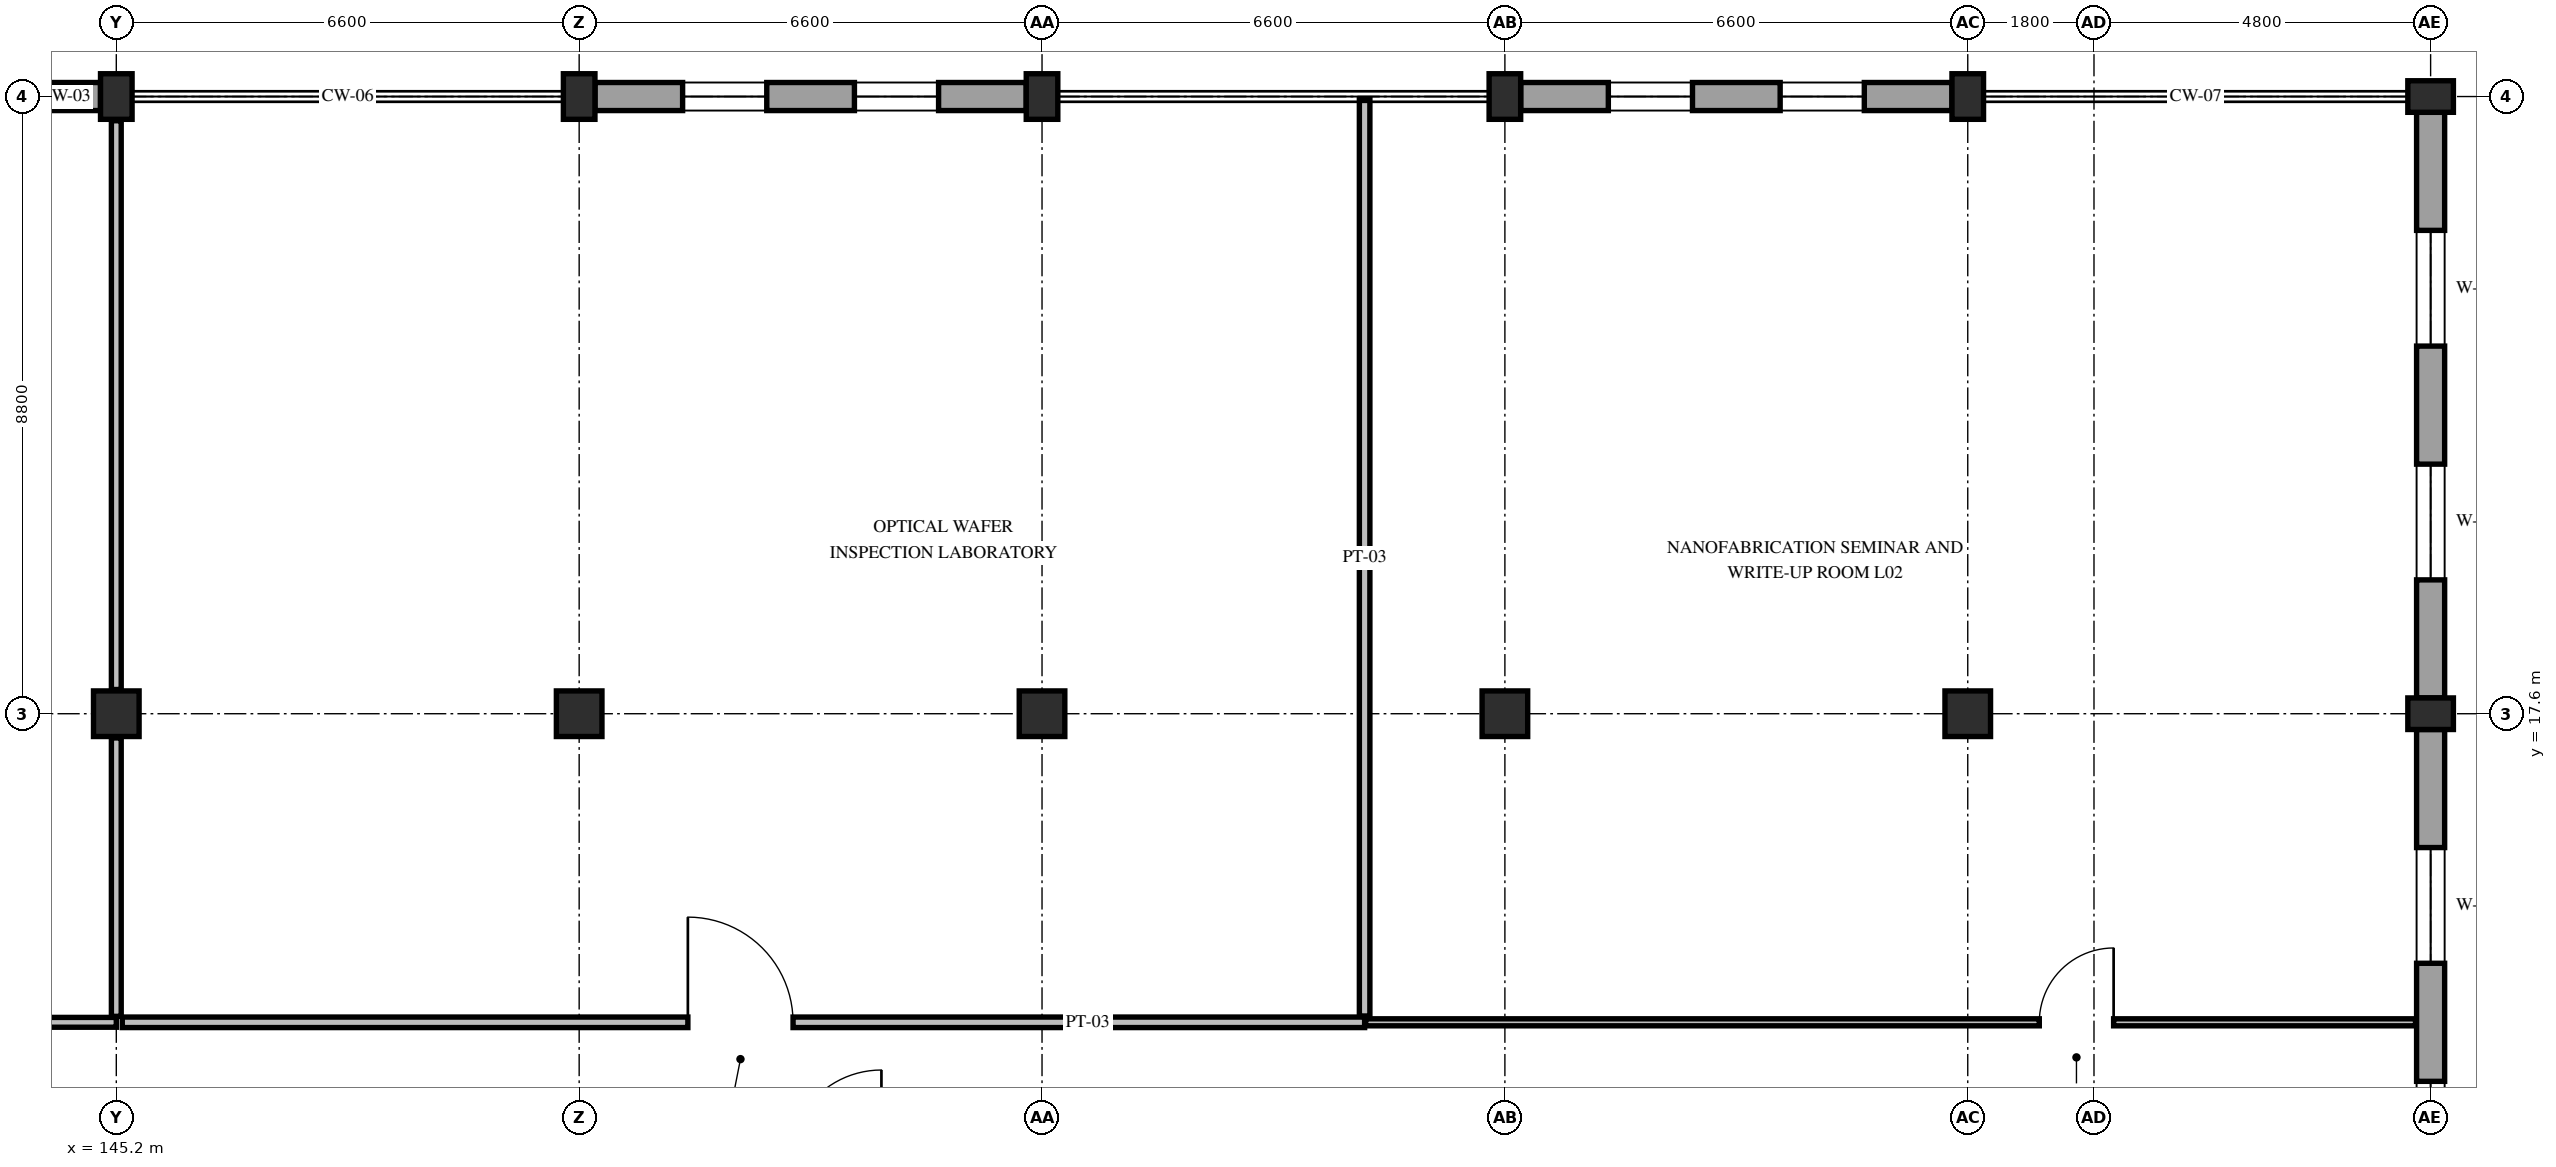
"""IFC4 building model, lengths in metres.
Left out: names, types, materials, properties, quantities, classifications, styles, units other than length and angle.
Written with IfcOpenShell. Run it as: python <this file> out.ifc"""

import sys

from ifc_helpers import new_model, si_unit, direction, frame, frame_2d, origin, origin_2d, place, context, subcontext, project, spatial, rectangle, extrude, element, fill, save


model = new_model("IFC4")
c1 = context("Model", 3, precision=1e-05, world=origin(), true_north=direction((0.0, 1.0)))
c2 = subcontext(c1, "Body", "Model", "MODEL_VIEW")
j1 = project(units=[si_unit("LENGTHUNIT", "METRE"), si_unit("PLANEANGLEUNIT", "RADIAN")], contexts=[c1])
p1 = place(None, origin())
s1 = spatial("IfcSite", under=j1, at=p1, CompositionType="ELEMENT")
p2 = place(p1, origin())
s2 = spatial("IfcBuilding", under=s1, at=p2, CompositionType="ELEMENT")
p3 = place(p2, frame((0.0, 0.0, 10.2)))
s3 = spatial("IfcBuildingStorey", under=s2, at=p3, CompositionType="ELEMENT", Elevation=10.2)
p4 = place(p3, frame((145.2, 17.6, 0.0), z_axis=(0.0, 0.0, 1.0), x_axis=(1.0, 0.0, 0.0)))
e1 = element("IfcColumn", 1, at=p4, inside=s3, PredefinedType="COLUMN", context=c2, shape_type="SweptSolid", body=[
    extrude(rectangle(XDim=0.65, YDim=0.65, at=origin_2d()), origin(), (0.0, 0.0, 1.0), 4.8),
])
p5 = place(p3, frame((145.2, 26.4, 0.0), z_axis=(0.0, 0.0, 1.0), x_axis=(1.0, 0.0, 0.0)))
e2 = element("IfcColumn", 2, at=p5, inside=s3, PredefinedType="PILASTER", context=c2, shape_type="SweptSolid", body=[
    extrude(rectangle(XDim=0.45, YDim=0.65, at=origin_2d()), origin(), (0.0, 0.0, 1.0), 4.8),
])
p6 = place(p3, frame((151.8, 17.6, 0.0), z_axis=(0.0, 0.0, 1.0), x_axis=(1.0, 0.0, 0.0)))
e3 = element("IfcColumn", 3, at=p6, inside=s3, PredefinedType="COLUMN", context=c2, shape_type="SweptSolid", body=[
    extrude(rectangle(XDim=0.65, YDim=0.65, at=origin_2d()), origin(), (0.0, 0.0, 1.0), 4.8),
])
p7 = place(p3, frame((151.8, 26.4, 0.0), z_axis=(0.0, 0.0, 1.0), x_axis=(1.0, 0.0, 0.0)))
e4 = element("IfcColumn", 4, at=p7, inside=s3, PredefinedType="PILASTER", context=c2, shape_type="SweptSolid", body=[
    extrude(rectangle(XDim=0.45, YDim=0.65, at=origin_2d()), origin(), (0.0, 0.0, 1.0), 4.8),
])
p8 = place(p3, frame((158.4, 17.6, 0.0), z_axis=(0.0, 0.0, 1.0), x_axis=(1.0, 0.0, 0.0)))
e5 = element("IfcColumn", 5, at=p8, inside=s3, PredefinedType="COLUMN", context=c2, shape_type="SweptSolid", body=[
    extrude(rectangle(XDim=0.65, YDim=0.65, at=origin_2d()), origin(), (0.0, 0.0, 1.0), 4.8),
])
p9 = place(p3, frame((158.4, 26.4, 0.0), z_axis=(0.0, 0.0, 1.0), x_axis=(1.0, 0.0, 0.0)))
e6 = element("IfcColumn", 6, at=p9, inside=s3, PredefinedType="PILASTER", context=c2, shape_type="SweptSolid", body=[
    extrude(rectangle(XDim=0.45, YDim=0.65, at=origin_2d()), origin(), (0.0, 0.0, 1.0), 4.8),
])
p10 = place(p3, frame((165.0, 17.6, 0.0), z_axis=(0.0, 0.0, 1.0), x_axis=(1.0, 0.0, 0.0)))
e7 = element("IfcColumn", 7, at=p10, inside=s3, PredefinedType="COLUMN", context=c2, shape_type="SweptSolid", body=[
    extrude(rectangle(XDim=0.65, YDim=0.65, at=origin_2d()), origin(), (0.0, 0.0, 1.0), 4.8),
])
p11 = place(p3, frame((165.0, 26.4, 0.0), z_axis=(0.0, 0.0, 1.0), x_axis=(1.0, 0.0, 0.0)))
e8 = element("IfcColumn", 8, at=p11, inside=s3, PredefinedType="PILASTER", context=c2, shape_type="SweptSolid", body=[
    extrude(rectangle(XDim=0.45, YDim=0.65, at=origin_2d()), origin(), (0.0, 0.0, 1.0), 4.8),
])
p12 = place(p3, frame((171.6, 17.6, 0.0), z_axis=(0.0, 0.0, 1.0), x_axis=(1.0, 0.0, 0.0)))
e9 = element("IfcColumn", 9, at=p12, inside=s3, PredefinedType="COLUMN", context=c2, shape_type="SweptSolid", body=[
    extrude(rectangle(XDim=0.65, YDim=0.65, at=origin_2d()), origin(), (0.0, 0.0, 1.0), 4.8),
])
for number, where, z_axis, x_axis in (
    (10, (171.6, 26.4, 0.0), (0.0, 0.0, 1.0), (1.0, 0.0, 0.0)),
    (11, (178.2, 17.6, 0.0), (0.0, 0.0, 1.0), (0.0, 1.0, 0.0)),
    (12, (178.2, 26.4, 0.0), (0.0, 0.0, 1.0), (0.0, 1.0, 0.0)),
):
    element("IfcColumn", number, at=place(p3, frame(where, z_axis=z_axis, x_axis=x_axis)), inside=s3, PredefinedType="PILASTER", context=c2, shape_type="SweptSolid", body=[
        extrude(rectangle(XDim=0.45, YDim=0.65, at=origin_2d()), origin(), (0.0, 0.0, 1.0), 4.8),
    ])
p13 = place(p3, frame((138.825, 26.4, 0.0), z_axis=(0.0, 0.0, 1.0), x_axis=(1.0, 0.0, 0.0)))
e13 = element("IfcWall", 13, at=p13, inside=s3, PredefinedType="STANDARD", context=c2, shape_type="SweptSolid", body=[
    extrude(rectangle(XDim=6.15, YDim=0.4, at=frame_2d((3.075, 0.0))), origin(), (0.0, 0.0, 1.0), 3.98),
])
p14 = place(p13, frame((1.25, 0.0, 0.85)))
e14 = element("IfcOpeningElement", 14, at=p14, cuts=e13, PredefinedType="OPENING", context=c2, shape_type="SweptSolid", body=[
    extrude(rectangle(XDim=1.2, YDim=1.88, at=frame_2d((0.6, 0.94))), frame((0.0, 0.215, 0.0), z_axis=(0.0, -1.0, 0.0), x_axis=(1.0, 0.0, 0.0)), (0.0, 0.0, 1.0), 0.43),
])
p15 = place(p13, frame((3.7, 0.0, 0.85)))
e15 = element("IfcOpeningElement", 15, at=p15, cuts=e13, PredefinedType="OPENING", context=c2, shape_type="SweptSolid", body=[
    extrude(rectangle(XDim=1.2, YDim=1.88, at=frame_2d((0.6, 0.94))), frame((0.0, 0.215, 0.0), z_axis=(0.0, -1.0, 0.0), x_axis=(1.0, 0.0, 0.0)), (0.0, 0.0, 1.0), 0.43),
])
p16 = place(p3, frame((152.025, 26.4, 0.0), z_axis=(0.0, 0.0, 1.0), x_axis=(1.0, 0.0, 0.0)))
e16 = element("IfcWall", 16, at=p16, inside=s3, PredefinedType="STANDARD", context=c2, shape_type="SweptSolid", body=[
    extrude(rectangle(XDim=6.15, YDim=0.4, at=frame_2d((3.075, 0.0))), origin(), (0.0, 0.0, 1.0), 3.98),
])
p17 = place(p16, frame((1.25, 0.0, 0.85)))
e17 = element("IfcOpeningElement", 17, at=p17, cuts=e16, PredefinedType="OPENING", context=c2, shape_type="SweptSolid", body=[
    extrude(rectangle(XDim=1.2, YDim=1.88, at=frame_2d((0.6, 0.94))), frame((0.0, 0.215, 0.0), z_axis=(0.0, -1.0, 0.0), x_axis=(1.0, 0.0, 0.0)), (0.0, 0.0, 1.0), 0.43),
])
p18 = place(p16, frame((3.7, 0.0, 0.85)))
e18 = element("IfcOpeningElement", 18, at=p18, cuts=e16, PredefinedType="OPENING", context=c2, shape_type="SweptSolid", body=[
    extrude(rectangle(XDim=1.2, YDim=1.88, at=frame_2d((0.6, 0.94))), frame((0.0, 0.215, 0.0), z_axis=(0.0, -1.0, 0.0), x_axis=(1.0, 0.0, 0.0)), (0.0, 0.0, 1.0), 0.43),
])
p19 = place(p3, frame((165.225, 26.4, 0.0), z_axis=(0.0, 0.0, 1.0), x_axis=(1.0, 0.0, 0.0)))
e19 = element("IfcWall", 19, at=p19, inside=s3, PredefinedType="STANDARD", context=c2, shape_type="SweptSolid", body=[
    extrude(rectangle(XDim=6.15, YDim=0.4, at=frame_2d((3.075, 0.0))), origin(), (0.0, 0.0, 1.0), 3.98),
])
p20 = place(p19, frame((1.25, 0.0, 0.85)))
e20 = element("IfcOpeningElement", 20, at=p20, cuts=e19, PredefinedType="OPENING", context=c2, shape_type="SweptSolid", body=[
    extrude(rectangle(XDim=1.2, YDim=1.88, at=frame_2d((0.6, 0.94))), frame((0.0, 0.215, 0.0), z_axis=(0.0, -1.0, 0.0), x_axis=(1.0, 0.0, 0.0)), (0.0, 0.0, 1.0), 0.43),
])
p21 = place(p19, frame((3.7, 0.0, 0.85)))
e21 = element("IfcOpeningElement", 21, at=p21, cuts=e19, PredefinedType="OPENING", context=c2, shape_type="SweptSolid", body=[
    extrude(rectangle(XDim=1.2, YDim=1.88, at=frame_2d((0.6, 0.94))), frame((0.0, 0.215, 0.0), z_axis=(0.0, -1.0, 0.0), x_axis=(1.0, 0.0, 0.0)), (0.0, 0.0, 1.0), 0.43),
])
p22 = place(p3, frame((178.2, 26.175, 0.0), z_axis=(0.0, 0.0, 1.0), x_axis=(0.0, -1.0, 0.0)))
e22 = element("IfcWall", 22, at=p22, inside=s3, PredefinedType="STANDARD", context=c2, shape_type="SweptSolid", body=[
    extrude(rectangle(XDim=8.35, YDim=0.4, at=frame_2d((4.175, 0.0))), origin(), (0.0, 0.0, 1.0), 3.98),
])
p23 = place(p22, frame((1.683, 0.0, 0.85)))
e23 = element("IfcOpeningElement", 23, at=p23, cuts=e22, PredefinedType="OPENING", context=c2, shape_type="SweptSolid", body=[
    extrude(rectangle(XDim=1.65, YDim=2.04, at=frame_2d((0.825, 1.02))), frame((0.0, 0.215, 0.0), z_axis=(0.0, -1.0, 0.0), x_axis=(1.0, 0.0, 0.0)), (0.0, 0.0, 1.0), 0.43),
])
p24 = place(p22, frame((5.017, 0.0, 0.85)))
e24 = element("IfcOpeningElement", 24, at=p24, cuts=e22, PredefinedType="OPENING", context=c2, shape_type="SweptSolid", body=[
    extrude(rectangle(XDim=1.65, YDim=2.04, at=frame_2d((0.825, 1.02))), frame((0.0, 0.215, 0.0), z_axis=(0.0, -1.0, 0.0), x_axis=(1.0, 0.0, 0.0)), (0.0, 0.0, 1.0), 0.43),
])
p25 = place(p3, frame((178.2, 17.375, 0.0), z_axis=(0.0, 0.0, 1.0), x_axis=(0.0, -1.0, 0.0)))
e25 = element("IfcWall", 25, at=p25, inside=s3, PredefinedType="STANDARD", context=c2, shape_type="SweptSolid", body=[
    extrude(rectangle(XDim=8.35, YDim=0.4, at=frame_2d((4.175, 0.0))), origin(), (0.0, 0.0, 1.0), 3.98),
])
p26 = place(p25, frame((1.683, 0.0, 0.85)))
e26 = element("IfcOpeningElement", 26, at=p26, cuts=e25, PredefinedType="OPENING", context=c2, shape_type="SweptSolid", body=[
    extrude(rectangle(XDim=1.65, YDim=2.04, at=frame_2d((0.825, 1.02))), frame((0.0, 0.215, 0.0), z_axis=(0.0, -1.0, 0.0), x_axis=(1.0, 0.0, 0.0)), (0.0, 0.0, 1.0), 0.43),
])
p27 = place(p25, frame((5.017, 0.0, 0.85)))
e27 = element("IfcOpeningElement", 27, at=p27, cuts=e25, PredefinedType="OPENING", context=c2, shape_type="SweptSolid", body=[
    extrude(rectangle(XDim=1.65, YDim=2.04, at=frame_2d((0.825, 1.02))), frame((0.0, 0.215, 0.0), z_axis=(0.0, -1.0, 0.0), x_axis=(1.0, 0.0, 0.0)), (0.0, 0.0, 1.0), 0.43),
])
p28 = place(p3, frame((118.885, 13.2, 0.0), z_axis=(0.0, 0.0, 1.0), x_axis=(1.0, 0.0, 0.0)))
e28 = element("IfcWall", 28, at=p28, inside=s3, PredefinedType="PARTITIONING", context=c2, shape_type="SweptSolid", body=[
    extrude(rectangle(XDim=26.315, YDim=0.14, at=frame_2d((13.157, 0.0))), origin(), (0.0, 0.0, 1.0), 4.065),
])
p29 = place(p28, frame((13.755, 0.0, 0.0)))
e29 = element("IfcOpeningElement", 29, at=p29, cuts=e28, PredefinedType="OPENING", context=c2, shape_type="SweptSolid", body=[
    extrude(rectangle(XDim=1.82, YDim=2.35, at=frame_2d((0.91, 1.175))), frame((0.0, 0.085, 0.0), z_axis=(0.0, -1.0, 0.0), x_axis=(1.0, 0.0, 0.0)), (0.0, 0.0, 1.0), 0.17),
])
p30 = place(p3, frame((145.2, 13.285, 0.0), z_axis=(0.0, 0.0, 1.0), x_axis=(0.0, 1.0, 0.0)))
e30 = element("IfcWall", 30, at=p30, inside=s3, PredefinedType="PARTITIONING", context=c2, shape_type="SweptSolid", body=[
    extrude(rectangle(XDim=3.97, YDim=0.14, at=frame_2d((1.985, 0.0))), origin(), (0.0, 0.0, 1.0), 4.065),
])
p31 = place(p3, frame((145.2, 17.945, 0.0), z_axis=(0.0, 0.0, 1.0), x_axis=(0.0, 1.0, 0.0)))
e31 = element("IfcWall", 31, at=p31, inside=s3, PredefinedType="PARTITIONING", context=c2, shape_type="SweptSolid", body=[
    extrude(rectangle(XDim=8.11, YDim=0.14, at=frame_2d((4.055, 0.0))), origin(), (0.0, 0.0, 1.0), 4.065),
])
p32 = place(p3, frame((145.285, 13.2, 0.0), z_axis=(0.0, 0.0, 1.0), x_axis=(1.0, 0.0, 0.0)))
e32 = element("IfcWall", 32, at=p32, inside=s3, PredefinedType="PARTITIONING", context=c2, shape_type="SweptSolid", body=[
    extrude(rectangle(XDim=17.715, YDim=0.15, at=frame_2d((8.857, 0.0))), origin(), (0.0, 0.0, 1.0), 4.065),
])
p33 = place(p32, frame((8.065, 0.0, 0.0)))
e33 = element("IfcOpeningElement", 33, at=p33, cuts=e32, PredefinedType="OPENING", context=c2, shape_type="SweptSolid", body=[
    extrude(rectangle(XDim=1.5, YDim=2.25, at=frame_2d((0.75, 1.125))), frame((0.0, 0.09, 0.0), z_axis=(0.0, -1.0, 0.0), x_axis=(1.0, 0.0, 0.0)), (0.0, 0.0, 1.0), 0.18),
])
p34 = place(p3, frame((163.0, 13.29, 0.0), z_axis=(0.0, 0.0, 1.0), x_axis=(0.0, 1.0, 0.0)))
e34 = element("IfcWall", 34, at=p34, inside=s3, PredefinedType="PARTITIONING", context=c2, shape_type="SweptSolid", body=[
    extrude(rectangle(XDim=13.07, YDim=0.15, at=frame_2d((6.535, 0.0))), origin(), (0.0, 0.0, 1.0), 3.98),
])
p35 = place(p3, frame((163.015, 13.2, 0.0), z_axis=(0.0, 0.0, 1.0), x_axis=(1.0, 0.0, 0.0)))
e35 = element("IfcWall", 35, at=p35, inside=s3, PredefinedType="PARTITIONING", context=c2, shape_type="SweptSolid", body=[
    extrude(rectangle(XDim=14.97, YDim=0.1, at=frame_2d((7.485, 0.0))), origin(), (0.0, 0.0, 1.0), 3.98),
])
p36 = place(p35, frame((9.605, 0.0, 0.0)))
e36 = element("IfcOpeningElement", 36, at=p36, cuts=e35, PredefinedType="OPENING", context=c2, shape_type="SweptSolid", body=[
    extrude(rectangle(XDim=1.06, YDim=2.2, at=frame_2d((0.53, 1.1))), frame((0.0, 0.065, 0.0), z_axis=(0.0, -1.0, 0.0), x_axis=(1.0, 0.0, 0.0)), (0.0, 0.0, 1.0), 0.13),
])
p37 = place(p17, origin())
e37 = element("IfcWindow", 37, at=p37, inside=s3, PartitioningType="SINGLE_PANEL", PredefinedType="WINDOW", context=c2, shape_type="SweptSolid", body=[
    extrude(rectangle(XDim=1.2, YDim=1.88, at=frame_2d((0.6, 0.94))), frame((0.0, 0.03, 0.0), z_axis=(0.0, -1.0, 0.0), x_axis=(1.0, 0.0, 0.0)), (0.0, 0.0, 1.0), 0.06),
])
fill(e17, e37)
p38 = place(p18, origin())
e38 = element("IfcWindow", 38, at=p38, inside=s3, PartitioningType="SINGLE_PANEL", PredefinedType="WINDOW", context=c2, shape_type="SweptSolid", body=[
    extrude(rectangle(XDim=1.2, YDim=1.88, at=frame_2d((0.6, 0.94))), frame((0.0, 0.03, 0.0), z_axis=(0.0, -1.0, 0.0), x_axis=(1.0, 0.0, 0.0)), (0.0, 0.0, 1.0), 0.06),
])
fill(e18, e38)
p39 = place(p20, origin())
e39 = element("IfcWindow", 39, at=p39, inside=s3, PartitioningType="SINGLE_PANEL", PredefinedType="WINDOW", context=c2, shape_type="SweptSolid", body=[
    extrude(rectangle(XDim=1.2, YDim=1.88, at=frame_2d((0.6, 0.94))), frame((0.0, 0.03, 0.0), z_axis=(0.0, -1.0, 0.0), x_axis=(1.0, 0.0, 0.0)), (0.0, 0.0, 1.0), 0.06),
])
fill(e20, e39)
p40 = place(p21, origin())
e40 = element("IfcWindow", 40, at=p40, inside=s3, PartitioningType="SINGLE_PANEL", PredefinedType="WINDOW", context=c2, shape_type="SweptSolid", body=[
    extrude(rectangle(XDim=1.2, YDim=1.88, at=frame_2d((0.6, 0.94))), frame((0.0, 0.03, 0.0), z_axis=(0.0, -1.0, 0.0), x_axis=(1.0, 0.0, 0.0)), (0.0, 0.0, 1.0), 0.06),
])
fill(e21, e40)
p41 = place(p23, origin())
e41 = element("IfcWindow", 41, at=p41, inside=s3, PartitioningType="SINGLE_PANEL", PredefinedType="WINDOW", context=c2, shape_type="SweptSolid", body=[
    extrude(rectangle(XDim=1.65, YDim=2.04, at=frame_2d((0.825, 1.02))), frame((0.0, 0.03, 0.0), z_axis=(0.0, -1.0, 0.0), x_axis=(1.0, 0.0, 0.0)), (0.0, 0.0, 1.0), 0.06),
])
fill(e23, e41)
p42 = place(p24, origin())
e42 = element("IfcWindow", 42, at=p42, inside=s3, PartitioningType="SINGLE_PANEL", PredefinedType="WINDOW", context=c2, shape_type="SweptSolid", body=[
    extrude(rectangle(XDim=1.65, YDim=2.04, at=frame_2d((0.825, 1.02))), frame((0.0, 0.03, 0.0), z_axis=(0.0, -1.0, 0.0), x_axis=(1.0, 0.0, 0.0)), (0.0, 0.0, 1.0), 0.06),
])
fill(e24, e42)
p43 = place(p26, origin())
e43 = element("IfcWindow", 43, at=p43, inside=s3, PartitioningType="SINGLE_PANEL", PredefinedType="WINDOW", context=c2, shape_type="SweptSolid", body=[
    extrude(rectangle(XDim=1.65, YDim=2.04, at=frame_2d((0.825, 1.02))), frame((0.0, 0.03, 0.0), z_axis=(0.0, -1.0, 0.0), x_axis=(1.0, 0.0, 0.0)), (0.0, 0.0, 1.0), 0.06),
])
fill(e26, e43)
p44 = place(p27, origin())
e44 = element("IfcWindow", 44, at=p44, inside=s3, PartitioningType="SINGLE_PANEL", PredefinedType="WINDOW", context=c2, shape_type="SweptSolid", body=[
    extrude(rectangle(XDim=1.65, YDim=2.04, at=frame_2d((0.825, 1.02))), frame((0.0, 0.03, 0.0), z_axis=(0.0, -1.0, 0.0), x_axis=(1.0, 0.0, 0.0)), (0.0, 0.0, 1.0), 0.06),
])
fill(e27, e44)
p45 = place(p33, origin())
e45 = element("IfcDoor", 45, at=p45, inside=s3, OperationType="SINGLE_SWING_LEFT", PredefinedType="DOOR", context=c2, shape_type="SweptSolid", body=[
    extrude(rectangle(XDim=1.5, YDim=2.25, at=frame_2d((0.75, 1.125))), frame((0.0, 0.025, 0.0), z_axis=(0.0, -1.0, 0.0), x_axis=(1.0, 0.0, 0.0)), (0.0, 0.0, 1.0), 0.05),
])
fill(e33, e45)
p46 = place(p36, origin())
e46 = element("IfcDoor", 46, at=p46, inside=s3, OperationType="SINGLE_SWING_RIGHT", PredefinedType="DOOR", context=c2, shape_type="SweptSolid", body=[
    extrude(rectangle(XDim=1.06, YDim=2.2, at=frame_2d((0.53, 1.1))), frame((0.0, 0.025, 0.0), z_axis=(0.0, -1.0, 0.0), x_axis=(1.0, 0.0, 0.0)), (0.0, 0.0, 1.0), 0.05),
])
fill(e36, e46)
save(model, sys.argv[1])
